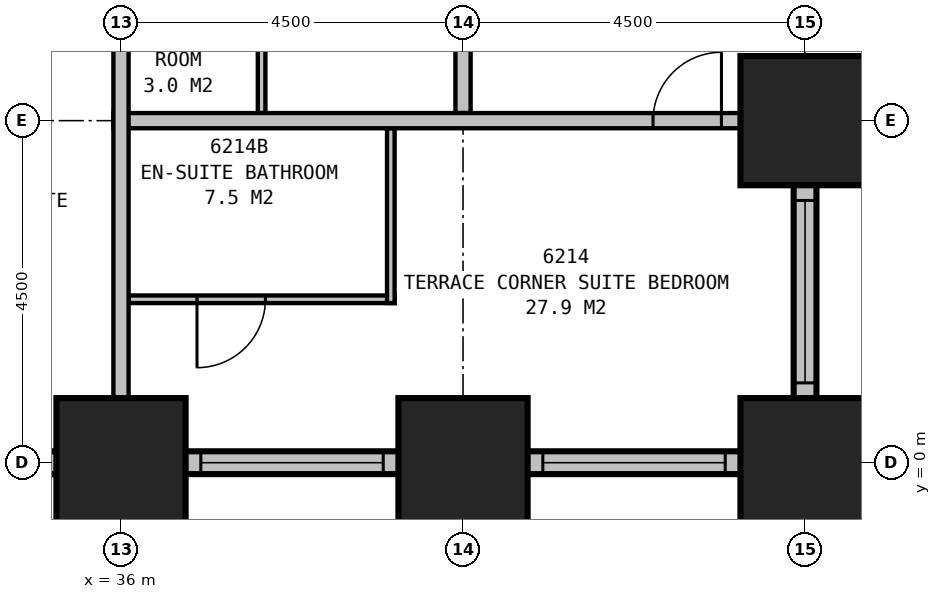
"""IFC4 building model, lengths in metres.
Left out: names, types, materials, properties, quantities, classifications, styles, units other than length and angle.
Written with IfcOpenShell. Run it as: python <this file> out.ifc"""

import sys

from ifc_helpers import new_model, si_unit, direction, frame, frame_2d, origin, origin_2d, place, context, subcontext, project, spatial, rectangle, extrude, element, fill, save


model = new_model("IFC4")
c1 = context("Model", 3, precision=1e-05, world=origin(), true_north=direction((0.0, 1.0)))
c2 = subcontext(c1, "Body", "Model", "MODEL_VIEW")
j1 = project(units=[si_unit("LENGTHUNIT", "METRE"), si_unit("PLANEANGLEUNIT", "RADIAN")], contexts=[c1])
p1 = place(None, origin())
s1 = spatial("IfcSite", under=j1, at=p1, CompositionType="ELEMENT")
p2 = place(p1, origin())
s2 = spatial("IfcBuilding", under=s1, at=p2, CompositionType="ELEMENT")
p3 = place(p2, frame((0.0, 0.0, 240.8)))
s3 = spatial("IfcBuildingStorey", under=s2, at=p3, CompositionType="ELEMENT", Elevation=240.8)
for number, where, z_axis, x_axis in (
    (1, (36.0, 0.0, 0.0), (0.0, 0.0, 1.0), (1.0, 0.0, 0.0)),
    (2, (40.5, 0.0, 0.0), (0.0, 0.0, 1.0), (1.0, 0.0, 0.0)),
    (3, (45.0, 0.0, 0.0), (0.0, 0.0, 1.0), (1.0, 0.0, 0.0)),
    (4, (45.0, 4.5, 0.0), (0.0, 0.0, 1.0), (1.0, 0.0, 0.0)),
):
    element("IfcColumn", number, at=place(p3, frame(where, z_axis=z_axis, x_axis=x_axis)), inside=s3, PredefinedType="COLUMN", context=c2, shape_type="SweptSolid", body=[
        extrude(rectangle(XDim=1.7, YDim=1.7, at=origin_2d()), origin(), (0.0, 0.0, 1.0), 3.9),
    ])
p4 = place(p3, frame((26.85, 0.0, 0.0), z_axis=(0.0, 0.0, 1.0), x_axis=(1.0, 0.0, 0.0)))
e5 = element("IfcWall", 5, at=p4, inside=s3, PredefinedType="STANDARD", context=c2, shape_type="SweptSolid", body=[
    extrude(rectangle(XDim=18.3, YDim=0.3, at=frame_2d((9.15, 0.0))), origin(), (0.0, 0.0, 1.0), 2.45),
])
p5 = place(p4, frame((1.2, 0.0, 0.5)))
e6 = element("IfcOpeningElement", 6, at=p5, cuts=e5, PredefinedType="OPENING", context=c2, shape_type="SweptSolid", body=[
    extrude(rectangle(XDim=2.4, YDim=1.75, at=frame_2d((1.2, 0.875))), frame((0.0, 0.16, 0.0), z_axis=(0.0, -1.0, 0.0), x_axis=(1.0, 0.0, 0.0)), (0.0, 0.0, 1.0), 0.32),
])
p6 = place(p4, frame((5.7, 0.0, 0.5)))
e7 = element("IfcOpeningElement", 7, at=p6, cuts=e5, PredefinedType="OPENING", context=c2, shape_type="SweptSolid", body=[
    extrude(rectangle(XDim=2.4, YDim=1.75, at=frame_2d((1.2, 0.875))), frame((0.0, 0.16, 0.0), z_axis=(0.0, -1.0, 0.0), x_axis=(1.0, 0.0, 0.0)), (0.0, 0.0, 1.0), 0.32),
])
p7 = place(p4, frame((10.2, 0.0, 0.5)))
e8 = element("IfcOpeningElement", 8, at=p7, cuts=e5, PredefinedType="OPENING", context=c2, shape_type="SweptSolid", body=[
    extrude(rectangle(XDim=2.4, YDim=1.75, at=frame_2d((1.2, 0.875))), frame((0.0, 0.16, 0.0), z_axis=(0.0, -1.0, 0.0), x_axis=(1.0, 0.0, 0.0)), (0.0, 0.0, 1.0), 0.32),
])
p8 = place(p4, frame((14.7, 0.0, 0.5)))
e9 = element("IfcOpeningElement", 9, at=p8, cuts=e5, PredefinedType="OPENING", context=c2, shape_type="SweptSolid", body=[
    extrude(rectangle(XDim=2.4, YDim=1.75, at=frame_2d((1.2, 0.875))), frame((0.0, 0.16, 0.0), z_axis=(0.0, -1.0, 0.0), x_axis=(1.0, 0.0, 0.0)), (0.0, 0.0, 1.0), 0.32),
])
p9 = place(p3, frame((45.0, -0.15, 0.0), z_axis=(0.0, 0.0, 1.0), x_axis=(0.0, 1.0, 0.0)))
e10 = element("IfcWall", 10, at=p9, inside=s3, PredefinedType="STANDARD", context=c2, shape_type="SweptSolid", body=[
    extrude(rectangle(XDim=4.8, YDim=0.3, at=frame_2d((2.4, 0.0))), origin(), (0.0, 0.0, 1.0), 2.45),
])
p10 = place(p9, frame((1.2, 0.0, 0.5)))
e11 = element("IfcOpeningElement", 11, at=p10, cuts=e10, PredefinedType="OPENING", context=c2, shape_type="SweptSolid", body=[
    extrude(rectangle(XDim=2.4, YDim=1.75, at=frame_2d((1.2, 0.875))), frame((0.0, 0.16, 0.0), z_axis=(0.0, -1.0, 0.0), x_axis=(1.0, 0.0, 0.0)), (0.0, 0.0, 1.0), 0.32),
])
p11 = place(p3, frame((44.85, 4.5, 0.0), z_axis=(0.0, 0.0, 1.0), x_axis=(1.0, 0.0, 0.0)))
e12 = element("IfcWall", 12, at=p11, inside=s3, PredefinedType="STANDARD", context=c2, shape_type="SweptSolid", body=[
    extrude(rectangle(XDim=4.3, YDim=0.3, at=frame_2d((2.15, 0.0))), origin(), (0.0, 0.0, 1.0), 2.45),
])
p12 = place(p11, frame((1.4, 0.0, 0.5)))
e13 = element("IfcOpeningElement", 13, at=p12, cuts=e12, PredefinedType="OPENING", context=c2, shape_type="SweptSolid", body=[
    extrude(rectangle(XDim=1.5, YDim=1.75, at=frame_2d((0.75, 0.875))), frame((0.0, 0.16, 0.0), z_axis=(0.0, -1.0, 0.0), x_axis=(1.0, 0.0, 0.0)), (0.0, 0.0, 1.0), 0.32),
])
p13 = place(p3, frame((49.017, 4.351, 0.0), z_axis=(0.0, 0.0, 1.0), x_axis=(-0.110433201132, 0.993883548555, 0.0)))
e14 = element("IfcWall", 14, at=p13, inside=s3, PredefinedType="STANDARD", context=c2, shape_type="SweptSolid", body=[
    extrude(rectangle(XDim=31.994, YDim=0.3, at=frame_2d((15.997, 0.0))), origin(), (0.0, 0.0, 1.0), 2.45),
])
p14 = place(p13, frame((1.664, 0.0, 0.5)))
e15 = element("IfcOpeningElement", 15, at=p14, cuts=e14, PredefinedType="OPENING", context=c2, shape_type="SweptSolid", body=[
    extrude(rectangle(XDim=1.5, YDim=1.75, at=frame_2d((0.75, 0.875))), frame((0.0, 0.16, 0.0), z_axis=(0.0, -1.0, 0.0), x_axis=(1.0, 0.0, 0.0)), (0.0, 0.0, 1.0), 0.32),
])
p15 = place(p13, frame((6.192, 0.0, 0.5)))
e16 = element("IfcOpeningElement", 16, at=p15, cuts=e14, PredefinedType="OPENING", context=c2, shape_type="SweptSolid", body=[
    extrude(rectangle(XDim=1.5, YDim=1.75, at=frame_2d((0.75, 0.875))), frame((0.0, 0.16, 0.0), z_axis=(0.0, -1.0, 0.0), x_axis=(1.0, 0.0, 0.0)), (0.0, 0.0, 1.0), 0.32),
])
p16 = place(p13, frame((10.719, 0.0, 0.5)))
e17 = element("IfcOpeningElement", 17, at=p16, cuts=e14, PredefinedType="OPENING", context=c2, shape_type="SweptSolid", body=[
    extrude(rectangle(XDim=1.5, YDim=1.75, at=frame_2d((0.75, 0.875))), frame((0.0, 0.16, 0.0), z_axis=(0.0, -1.0, 0.0), x_axis=(1.0, 0.0, 0.0)), (0.0, 0.0, 1.0), 0.32),
])
p17 = place(p13, frame((15.247, 0.0, 0.5)))
e18 = element("IfcOpeningElement", 18, at=p17, cuts=e14, PredefinedType="OPENING", context=c2, shape_type="SweptSolid", body=[
    extrude(rectangle(XDim=1.5, YDim=1.75, at=frame_2d((0.75, 0.875))), frame((0.0, 0.16, 0.0), z_axis=(0.0, -1.0, 0.0), x_axis=(1.0, 0.0, 0.0)), (0.0, 0.0, 1.0), 0.32),
])
p18 = place(p13, frame((19.775, 0.0, 0.5)))
e19 = element("IfcOpeningElement", 19, at=p18, cuts=e14, PredefinedType="OPENING", context=c2, shape_type="SweptSolid", body=[
    extrude(rectangle(XDim=1.5, YDim=1.75, at=frame_2d((0.75, 0.875))), frame((0.0, 0.16, 0.0), z_axis=(0.0, -1.0, 0.0), x_axis=(1.0, 0.0, 0.0)), (0.0, 0.0, 1.0), 0.32),
])
p19 = place(p13, frame((24.302, 0.0, 0.5)))
e20 = element("IfcOpeningElement", 20, at=p19, cuts=e14, PredefinedType="OPENING", context=c2, shape_type="SweptSolid", body=[
    extrude(rectangle(XDim=1.5, YDim=1.75, at=frame_2d((0.75, 0.875))), frame((0.0, 0.16, 0.0), z_axis=(0.0, -1.0, 0.0), x_axis=(1.0, 0.0, 0.0)), (0.0, 0.0, 1.0), 0.32),
])
p20 = place(p13, frame((28.83, 0.0, 0.5)))
e21 = element("IfcOpeningElement", 21, at=p20, cuts=e14, PredefinedType="OPENING", context=c2, shape_type="SweptSolid", body=[
    extrude(rectangle(XDim=1.5, YDim=1.75, at=frame_2d((0.75, 0.875))), frame((0.0, 0.16, 0.0), z_axis=(0.0, -1.0, 0.0), x_axis=(1.0, 0.0, 0.0)), (0.0, 0.0, 1.0), 0.32),
])
p21 = place(p3, frame((36.0, 10.6, 0.0), z_axis=(0.0, 0.0, 1.0), x_axis=(0.0, -1.0, 0.0)))
e22 = element("IfcWall", 22, at=p21, inside=s3, PredefinedType="PARTITIONING", context=c2, shape_type="SweptSolid", body=[
    extrude(rectangle(XDim=10.6, YDim=0.2, at=frame_2d((5.3, 0.0))), origin(), (0.0, 0.0, 1.0), 2.6),
])
p22 = place(p3, frame((35.9, 4.5, 0.0), z_axis=(0.0, 0.0, 1.0), x_axis=(1.0, 0.0, 0.0)))
e23 = element("IfcWall", 23, at=p22, inside=s3, PredefinedType="PARTITIONING", context=c2, shape_type="SweptSolid", body=[
    extrude(rectangle(XDim=9.1, YDim=0.2, at=frame_2d((4.55, 0.0))), origin(), (0.0, 0.0, 1.0), 3.65),
])
p23 = place(p22, frame((7.1, 0.0, 0.0)))
e24 = element("IfcOpeningElement", 24, at=p23, cuts=e23, PredefinedType="OPENING", context=c2, shape_type="SweptSolid", body=[
    extrude(rectangle(XDim=0.9, YDim=2.1, at=frame_2d((0.45, 1.05))), frame((0.0, 0.11, 0.0), z_axis=(0.0, -1.0, 0.0), x_axis=(1.0, 0.0, 0.0)), (0.0, 0.0, 1.0), 0.22),
])
p24 = place(p3, frame((40.5, 4.6, 0.0), z_axis=(0.0, 0.0, 1.0), x_axis=(0.0, 1.0, 0.0)))
e25 = element("IfcWall", 25, at=p24, inside=s3, PredefinedType="PARTITIONING", context=c2, shape_type="SweptSolid", body=[
    extrude(rectangle(XDim=8.8, YDim=0.2, at=frame_2d((4.4, 0.0))), origin(), (0.0, 0.0, 1.0), 2.6),
])
p25 = place(p24, frame((4.05, 0.0, 0.0)))
e26 = element("IfcOpeningElement", 26, at=p25, cuts=e25, PredefinedType="OPENING", context=c2, shape_type="SweptSolid", body=[
    extrude(rectangle(XDim=0.9, YDim=2.1, at=frame_2d((0.45, 1.05))), frame((0.0, 0.11, 0.0), z_axis=(0.0, -1.0, 0.0), x_axis=(1.0, 0.0, 0.0)), (0.0, 0.0, 1.0), 0.22),
])
p26 = place(p3, frame((37.85, 4.6, 0.0), z_axis=(0.0, 0.0, 1.0), x_axis=(0.0, 1.0, 0.0)))
e27 = element("IfcWall", 27, at=p26, inside=s3, PredefinedType="PLUMBINGWALL", context=c2, shape_type="SweptSolid", body=[
    extrude(rectangle(XDim=2.0, YDim=0.1, at=frame_2d((1.0, 0.0))), origin(), (0.0, 0.0, 1.0), 3.65),
])
p27 = place(p3, frame((39.55, 4.4, 0.0), z_axis=(0.0, 0.0, 1.0), x_axis=(0.0, -1.0, 0.0)))
e28 = element("IfcWall", 28, at=p27, inside=s3, PredefinedType="PLUMBINGWALL", context=c2, shape_type="SweptSolid", body=[
    extrude(rectangle(XDim=2.3, YDim=0.1, at=frame_2d((1.15, 0.0))), origin(), (0.0, 0.0, 1.0), 3.65),
])
p28 = place(p3, frame((36.1, 2.15, 0.0), z_axis=(0.0, 0.0, 1.0), x_axis=(1.0, 0.0, 0.0)))
e29 = element("IfcWall", 29, at=p28, inside=s3, PredefinedType="PLUMBINGWALL", context=c2, shape_type="SweptSolid", body=[
    extrude(rectangle(XDim=3.5, YDim=0.1, at=frame_2d((1.75, 0.0))), origin(), (0.0, 0.0, 1.0), 3.65),
])
p29 = place(p28, frame((1.8, 0.0, 0.0), z_axis=(0.0, 0.0, 1.0), x_axis=(-1.0, 0.0, 0.0)))
e30 = element("IfcOpeningElement", 30, at=p29, cuts=e29, PredefinedType="OPENING", context=c2, shape_type="SweptSolid", body=[
    extrude(rectangle(XDim=0.9, YDim=2.1, at=frame_2d((0.45, 1.05))), frame((0.0, 0.06, 0.0), z_axis=(0.0, -1.0, 0.0), x_axis=(1.0, 0.0, 0.0)), (0.0, 0.0, 1.0), 0.12),
])
p30 = place(p7, origin())
e31 = element("IfcWindow", 31, at=p30, inside=s3, PartitioningType="SINGLE_PANEL", PredefinedType="WINDOW", context=c2, shape_type="SweptSolid", body=[
    extrude(rectangle(XDim=2.4, YDim=1.75, at=frame_2d((1.2, 0.875))), frame((0.0, 0.03, 0.0), z_axis=(0.0, -1.0, 0.0), x_axis=(1.0, 0.0, 0.0)), (0.0, 0.0, 1.0), 0.06),
])
fill(e8, e31)
p31 = place(p8, origin())
e32 = element("IfcWindow", 32, at=p31, inside=s3, PartitioningType="SINGLE_PANEL", PredefinedType="WINDOW", context=c2, shape_type="SweptSolid", body=[
    extrude(rectangle(XDim=2.4, YDim=1.75, at=frame_2d((1.2, 0.875))), frame((0.0, 0.03, 0.0), z_axis=(0.0, -1.0, 0.0), x_axis=(1.0, 0.0, 0.0)), (0.0, 0.0, 1.0), 0.06),
])
fill(e9, e32)
p32 = place(p10, origin())
e33 = element("IfcWindow", 33, at=p32, inside=s3, PartitioningType="SINGLE_PANEL", PredefinedType="WINDOW", context=c2, shape_type="SweptSolid", body=[
    extrude(rectangle(XDim=2.4, YDim=1.75, at=frame_2d((1.2, 0.875))), frame((0.0, 0.03, 0.0), z_axis=(0.0, -1.0, 0.0), x_axis=(1.0, 0.0, 0.0)), (0.0, 0.0, 1.0), 0.06),
])
fill(e11, e33)
p33 = place(p23, origin())
e34 = element("IfcDoor", 34, at=p33, inside=s3, OperationType="SINGLE_SWING_RIGHT", PredefinedType="DOOR", context=c2, shape_type="SweptSolid", body=[
    extrude(rectangle(XDim=0.9, YDim=2.1, at=frame_2d((0.45, 1.05))), frame((0.0, 0.025, 0.0), z_axis=(0.0, -1.0, 0.0), x_axis=(1.0, 0.0, 0.0)), (0.0, 0.0, 1.0), 0.05),
])
fill(e24, e34)
p34 = place(p29, origin())
e35 = element("IfcDoor", 35, at=p34, inside=s3, OperationType="SINGLE_SWING_RIGHT", PredefinedType="DOOR", context=c2, shape_type="SweptSolid", body=[
    extrude(rectangle(XDim=0.9, YDim=2.1, at=frame_2d((0.45, 1.05))), frame((0.0, 0.025, 0.0), z_axis=(0.0, -1.0, 0.0), x_axis=(1.0, 0.0, 0.0)), (0.0, 0.0, 1.0), 0.05),
])
fill(e30, e35)
save(model, sys.argv[1])
